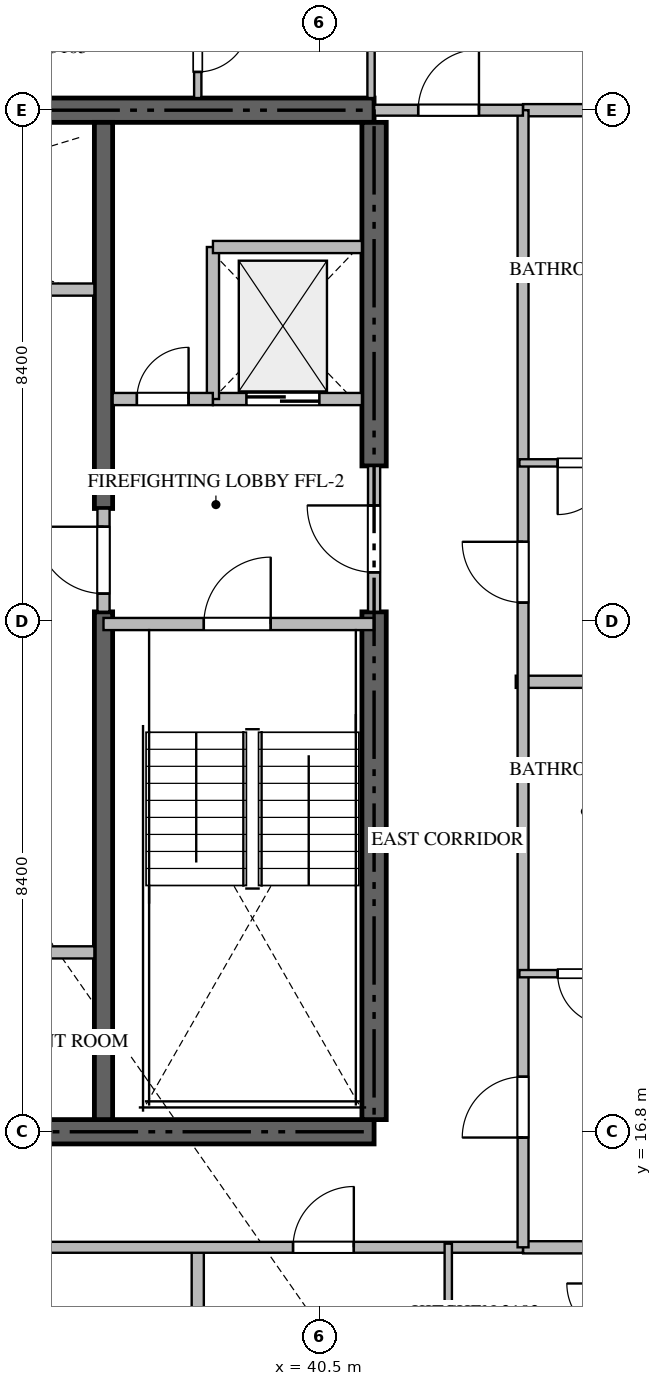
"""IFC4 building model, lengths in metres.
Left out: names, types, materials, properties, quantities, classifications, styles, units other than length and angle.
Written with IfcOpenShell. Run it as: python <this file> out.ifc"""

import sys

from ifc_helpers import new_model, si_unit, direction, frame, frame_2d, origin, place, context, subcontext, project, spatial, rectangle, extrude, source, transform, mapped, element, fill, save


model = new_model("IFC4")
c1 = context("Model", 3, precision=1e-05, world=origin(), true_north=direction((0.0, 1.0)))
c2 = subcontext(c1, "Body", "Model", "MODEL_VIEW")
j1 = project(units=[si_unit("LENGTHUNIT", "METRE"), si_unit("PLANEANGLEUNIT", "RADIAN")], contexts=[c1])
p1 = place(None, origin())
s1 = spatial("IfcSite", under=j1, at=p1, CompositionType="ELEMENT")
p2 = place(p1, origin())
s2 = spatial("IfcBuilding", under=s1, at=p2, CompositionType="ELEMENT")
p3 = place(p2, frame((0.0, 0.0, 127.65)))
s3 = spatial("IfcBuildingStorey", under=s2, at=p3, CompositionType="ELEMENT", Elevation=127.65)
for number, where, z_axis, x_axis in (
    (1, (23.4, 16.8, -0.26), (0.0, 0.0, 1.0), (1.0, 0.0, 0.0)),
    (2, (41.4, 33.6, -0.26), (0.0, 0.0, 1.0), (-1.0, 0.0, 0.0)),
):
    element("IfcWall", number, at=place(p3, frame(where, z_axis=z_axis, x_axis=x_axis)), inside=s3, PredefinedType="SHEAR", context=c2, shape_type="SweptSolid", body=[
        extrude(rectangle(XDim=18.0, YDim=0.4, at=frame_2d((9.0, 0.0))), origin(), (0.0, 0.0, 1.0), 3.748),
    ])
p4 = place(p3, frame((41.4, 17.0, -0.26), z_axis=(0.0, 0.0, 1.0), x_axis=(0.0, 1.0, 0.0)))
e3 = element("IfcWall", 3, at=p4, inside=s3, PredefinedType="SHEAR", context=c2, shape_type="SweptSolid", body=[
    extrude(rectangle(XDim=8.35, YDim=0.4, at=frame_2d((4.175, 0.0))), origin(), (0.0, 0.0, 1.0), 3.748),
])
p5 = place(p3, frame((41.4, 27.75, -0.26), z_axis=(0.0, 0.0, 1.0), x_axis=(0.0, 1.0, 0.0)))
e4 = element("IfcWall", 4, at=p5, inside=s3, PredefinedType="SHEAR", context=c2, shape_type="SweptSolid", body=[
    extrude(rectangle(XDim=5.65, YDim=0.4, at=frame_2d((2.825, 0.0))), origin(), (0.0, 0.0, 1.0), 3.748),
])
p6 = place(p3, frame((36.95, 17.0, -0.26), z_axis=(0.0, 0.0, 1.0), x_axis=(0.0, 1.0, 0.0)))
e5 = element("IfcWall", 5, at=p6, inside=s3, PredefinedType="SHEAR", context=c2, shape_type="SweptSolid", body=[
    extrude(rectangle(XDim=8.35, YDim=0.3, at=frame_2d((4.175, 0.0))), origin(), (0.0, 0.0, 1.0), 3.748),
])
p7 = place(p3, frame((36.95, 27.05, -0.26), z_axis=(0.0, 0.0, 1.0), x_axis=(0.0, 1.0, 0.0)))
e6 = element("IfcWall", 6, at=p7, inside=s3, PredefinedType="SHEAR", context=c2, shape_type="SweptSolid", body=[
    extrude(rectangle(XDim=6.35, YDim=0.3, at=frame_2d((3.175, 0.0))), origin(), (0.0, 0.0, 1.0), 3.748),
])
p8 = place(p3, frame((36.95, 25.15, 0.0), z_axis=(0.0, 0.0, 1.0), x_axis=(1.0, 0.0, 0.0)))
e7 = element("IfcWall", 7, at=p8, inside=s3, PredefinedType="STANDARD", context=c2, shape_type="SweptSolid", body=[
    extrude(rectangle(XDim=4.45, YDim=0.2, at=frame_2d((2.225, 0.0))), origin(), (0.0, 0.0, 1.0), 3.49),
])
p9 = place(p8, frame((1.65, 0.0, 0.0)))
e8 = element("IfcOpeningElement", 8, at=p9, cuts=e7, PredefinedType="OPENING", context=c2, shape_type="SweptSolid", body=[
    extrude(rectangle(XDim=1.1, YDim=2.15, at=frame_2d((0.55, 1.075))), frame((0.0, 0.11, 0.0), z_axis=(0.0, -1.0, 0.0), x_axis=(1.0, 0.0, 0.0)), (0.0, 0.0, 1.0), 0.22),
])
p10 = place(p3, frame((38.75, 28.85, 0.0), z_axis=(0.0, 0.0, 1.0), x_axis=(1.0, 0.0, 0.0)))
e9 = element("IfcWall", 9, at=p10, inside=s3, PredefinedType="STANDARD", context=c2, shape_type="SweptSolid", body=[
    extrude(rectangle(XDim=2.45, YDim=0.2, at=frame_2d((1.225, 0.0))), origin(), (0.0, 0.0, 1.0), 3.49),
])
p11 = place(p10, frame((0.55, 0.0, 0.0)))
e10 = element("IfcOpeningElement", 10, at=p11, cuts=e9, PredefinedType="OPENING", context=c2, shape_type="SweptSolid", body=[
    extrude(rectangle(XDim=1.2, YDim=2.2, at=frame_2d((0.6, 1.1))), frame((0.0, 0.11, 0.0), z_axis=(0.0, -1.0, 0.0), x_axis=(1.0, 0.0, 0.0)), (0.0, 0.0, 1.0), 0.22),
])
p12 = place(p3, frame((35.0, 30.65, 0.0), z_axis=(0.0, 0.0, 1.0), x_axis=(1.0, 0.0, 0.0)))
e11 = element("IfcWall", 11, at=p12, inside=s3, PredefinedType="STANDARD", context=c2, shape_type="SweptSolid", body=[
    extrude(rectangle(XDim=1.8, YDim=0.2, at=frame_2d((0.9, 0.0))), origin(), (0.0, 0.0, 1.0), 3.49),
])
p13 = place(p3, frame((38.75, 28.85, 0.0), z_axis=(0.0, 0.0, 1.0), x_axis=(0.0, 1.0, 0.0)))
e12 = element("IfcWall", 12, at=p13, inside=s3, PredefinedType="STANDARD", context=c2, shape_type="SweptSolid", body=[
    extrude(rectangle(XDim=2.5, YDim=0.2, at=frame_2d((1.25, 0.0))), origin(), (0.0, 0.0, 1.0), 3.49),
])
p14 = place(p3, frame((38.75, 31.35, 0.0), z_axis=(0.0, 0.0, 1.0), x_axis=(1.0, 0.0, 0.0)))
e13 = element("IfcWall", 13, at=p14, inside=s3, PredefinedType="STANDARD", context=c2, shape_type="SweptSolid", body=[
    extrude(rectangle(XDim=2.45, YDim=0.2, at=frame_2d((1.225, 0.0))), origin(), (0.0, 0.0, 1.0), 3.49),
])
p15 = place(p3, frame((37.1, 28.85, 0.0), z_axis=(0.0, 0.0, 1.0), x_axis=(1.0, 0.0, 0.0)))
e14 = element("IfcWall", 14, at=p15, inside=s3, PredefinedType="STANDARD", context=c2, shape_type="SweptSolid", body=[
    extrude(rectangle(XDim=1.648, YDim=0.2, at=frame_2d((0.824, 0.0))), origin(), (0.0, 0.0, 1.0), 3.49),
])
p16 = place(p15, frame((0.399, 0.0, 0.0)))
e15 = element("IfcOpeningElement", 15, at=p16, cuts=e14, PredefinedType="OPENING", context=c2, shape_type="SweptSolid", body=[
    extrude(rectangle(XDim=0.85, YDim=2.1, at=frame_2d((0.425, 1.05))), frame((0.0, 0.11, 0.0), z_axis=(0.0, -1.0, 0.0), x_axis=(1.0, 0.0, 0.0)), (0.0, 0.0, 1.0), 0.22),
])
p17 = place(p3, frame((41.4, 25.352, 0.0), z_axis=(0.0, 0.0, 1.0), x_axis=(0.0, 1.0, 0.0)))
e16 = element("IfcWall", 16, at=p17, inside=s3, PredefinedType="STANDARD", context=c2, shape_type="SweptSolid", body=[
    extrude(rectangle(XDim=2.396, YDim=0.2, at=frame_2d((1.198, 0.0))), origin(), (0.0, 0.0, 1.0), 3.49),
])
p18 = place(p17, frame((0.648, 0.0, 0.0)))
e17 = element("IfcOpeningElement", 17, at=p18, cuts=e16, PredefinedType="OPENING", context=c2, shape_type="SweptSolid", body=[
    extrude(rectangle(XDim=1.1, YDim=2.15, at=frame_2d((0.55, 1.075))), frame((0.0, 0.11, 0.0), z_axis=(0.0, -1.0, 0.0), x_axis=(1.0, 0.0, 0.0)), (0.0, 0.0, 1.0), 0.22),
])
p19 = place(p3, frame((36.95, 25.352, 0.0), z_axis=(0.0, 0.0, 1.0), x_axis=(0.0, 1.0, 0.0)))
e18 = element("IfcWall", 18, at=p19, inside=s3, PredefinedType="STANDARD", context=c2, shape_type="SweptSolid", body=[
    extrude(rectangle(XDim=1.696, YDim=0.2, at=frame_2d((0.848, 0.0))), origin(), (0.0, 0.0, 1.0), 3.49),
])
p20 = place(p19, frame((0.298, 0.0, 0.0)))
e19 = element("IfcOpeningElement", 19, at=p20, cuts=e18, PredefinedType="OPENING", context=c2, shape_type="SweptSolid", body=[
    extrude(rectangle(XDim=1.1, YDim=2.15, at=frame_2d((0.55, 1.075))), frame((0.0, 0.11, 0.0), z_axis=(0.0, -1.0, 0.0), x_axis=(1.0, 0.0, 0.0)), (0.0, 0.0, 1.0), 0.22),
])
p21 = place(p3, frame((28.0, 19.75, 0.0), z_axis=(0.0, 0.0, 1.0), x_axis=(1.0, 0.0, 0.0)))
e20 = element("IfcWall", 20, at=p21, inside=s3, PredefinedType="STANDARD", context=c2, shape_type="SweptSolid", body=[
    extrude(rectangle(XDim=8.8, YDim=0.2, at=frame_2d((4.4, 0.0))), origin(), (0.0, 0.0, 1.0), 3.49),
])
p22 = place(p21, frame((3.95, 0.0, 0.0)))
e21 = element("IfcOpeningElement", 21, at=p22, cuts=e20, PredefinedType="OPENING", context=c2, shape_type="SweptSolid", body=[
    extrude(rectangle(XDim=0.9, YDim=2.1, at=frame_2d((0.45, 1.05))), frame((0.0, 0.11, 0.0), z_axis=(0.0, -1.0, 0.0), x_axis=(1.0, 0.0, 0.0)), (0.0, 0.0, 1.0), 0.22),
])
p23 = place(p3, frame((38.5, 1.482, 0.0), z_axis=(0.0, 0.0, 1.0), x_axis=(0.0, 1.0, 0.0)))
e22 = element("IfcWall", 22, at=p23, inside=s3, PredefinedType="PARTITIONING", context=c2, shape_type="SweptSolid", body=[
    extrude(rectangle(XDim=13.418, YDim=0.2, at=frame_2d((6.709, 0.0))), origin(), (0.0, 0.0, 1.0), 3.49),
])
p24 = place(p3, frame((43.73, 24.2, 0.0), z_axis=(0.0, 0.0, 1.0), x_axis=(1.0, 0.0, 0.0)))
e23 = element("IfcWall", 23, at=p24, inside=s3, PredefinedType="PARTITIONING", context=c2, shape_type="SweptSolid", body=[
    extrude(rectangle(XDim=13.188, YDim=0.2, at=frame_2d((6.594, 0.0))), origin(), (0.0, 0.0, 1.0), 3.49),
])
for number, where, z_axis, x_axis in (
    (24, (43.85, 14.9, 0.0), (0.0, 0.0, 1.0), (1.0, 0.0, 0.0)),
    (25, (43.85, 33.6, 0.0), (0.0, 0.0, 1.0), (1.0, 0.0, 0.0)),
):
    element("IfcWall", number, at=place(p3, frame(where, z_axis=z_axis, x_axis=x_axis)), inside=s3, PredefinedType="PARTITIONING", context=c2, shape_type="SweptSolid", body=[
        extrude(rectangle(XDim=13.068, YDim=0.2, at=frame_2d((6.534, 0.0))), origin(), (0.0, 0.0, 1.0), 3.49),
    ])
p25 = place(p3, frame((20.952, 14.9, 0.0), z_axis=(0.0, 0.0, 1.0), x_axis=(1.0, 0.0, 0.0)))
e26 = element("IfcWall", 26, at=p25, inside=s3, PredefinedType="PARTITIONING", context=c2, shape_type="SweptSolid", body=[
    extrude(rectangle(XDim=22.896, YDim=0.18, at=frame_2d((11.448, 0.0))), origin(), (0.0, 0.0, 1.0), 3.49),
])
p26 = place(p25, frame((2.781, 0.0, 0.0)))
e27 = element("IfcOpeningElement", 27, at=p26, cuts=e26, PredefinedType="OPENING", context=c2, shape_type="SweptSolid", body=[
    extrude(rectangle(XDim=1.0, YDim=2.15, at=frame_2d((0.5, 1.075))), frame((0.0, 0.1, 0.0), z_axis=(0.0, -1.0, 0.0), x_axis=(1.0, 0.0, 0.0)), (0.0, 0.0, 1.0), 0.2),
])
p27 = place(p25, frame((7.16, 0.0, 0.0)))
e28 = element("IfcOpeningElement", 28, at=p27, cuts=e26, PredefinedType="OPENING", context=c2, shape_type="SweptSolid", body=[
    extrude(rectangle(XDim=1.0, YDim=2.15, at=frame_2d((0.5, 1.075))), frame((0.0, 0.1, 0.0), z_axis=(0.0, -1.0, 0.0), x_axis=(1.0, 0.0, 0.0)), (0.0, 0.0, 1.0), 0.2),
])
p28 = place(p25, frame((19.115, 0.0, 0.0)))
e29 = element("IfcOpeningElement", 29, at=p28, cuts=e26, PredefinedType="OPENING", context=c2, shape_type="SweptSolid", body=[
    extrude(rectangle(XDim=1.0, YDim=2.15, at=frame_2d((0.5, 1.075))), frame((0.0, 0.1, 0.0), z_axis=(0.0, -1.0, 0.0), x_axis=(1.0, 0.0, 0.0)), (0.0, 0.0, 1.0), 0.2),
])
p29 = place(p3, frame((43.85, 14.9, 0.0), z_axis=(0.0, 0.0, 1.0), x_axis=(0.0, 1.0, 0.0)))
e30 = element("IfcWall", 30, at=p29, inside=s3, PredefinedType="PARTITIONING", context=c2, shape_type="SweptSolid", body=[
    extrude(rectangle(XDim=18.7, YDim=0.18, at=frame_2d((9.35, 0.0))), origin(), (0.0, 0.0, 1.0), 3.49),
])
p30 = place(p29, frame((1.805, 0.0, 0.0)))
e31 = element("IfcOpeningElement", 31, at=p30, cuts=e30, PredefinedType="OPENING", context=c2, shape_type="SweptSolid", body=[
    extrude(rectangle(XDim=1.0, YDim=2.15, at=frame_2d((0.5, 1.075))), frame((0.0, 0.1, 0.0), z_axis=(0.0, -1.0, 0.0), x_axis=(1.0, 0.0, 0.0)), (0.0, 0.0, 1.0), 0.2),
])
p31 = place(p29, frame((10.602, 0.0, 0.0)))
e32 = element("IfcOpeningElement", 32, at=p31, cuts=e30, PredefinedType="OPENING", context=c2, shape_type="SweptSolid", body=[
    extrude(rectangle(XDim=1.0, YDim=2.15, at=frame_2d((0.5, 1.075))), frame((0.0, 0.1, 0.0), z_axis=(0.0, -1.0, 0.0), x_axis=(1.0, 0.0, 0.0)), (0.0, 0.0, 1.0), 0.2),
])
p32 = place(p3, frame((41.402, 33.6, 0.0), z_axis=(0.0, 0.0, 1.0), x_axis=(1.0, 0.0, 0.0)))
e33 = element("IfcWall", 33, at=p32, inside=s3, PredefinedType="PARTITIONING", context=c2, shape_type="SweptSolid", body=[
    extrude(rectangle(XDim=2.446, YDim=0.18, at=frame_2d((1.223, 0.0))), origin(), (0.0, 0.0, 1.0), 3.49),
])
p33 = place(p32, frame((0.723, 0.0, 0.0)))
e34 = element("IfcOpeningElement", 34, at=p33, cuts=e33, PredefinedType="OPENING", context=c2, shape_type="SweptSolid", body=[
    extrude(rectangle(XDim=1.0, YDim=2.15, at=frame_2d((0.5, 1.075))), frame((0.0, 0.1, 0.0), z_axis=(0.0, -1.0, 0.0), x_axis=(1.0, 0.0, 0.0)), (0.0, 0.0, 1.0), 0.2),
])
p34 = place(p3, frame((42.62, 12.15, 0.0), z_axis=(0.0, 0.0, 1.0), x_axis=(0.0, 1.0, 0.0)))
e35 = element("IfcWall", 35, at=p34, inside=s3, PredefinedType="PARTITIONING", context=c2, shape_type="SweptSolid", body=[
    extrude(rectangle(XDim=2.81, YDim=0.12, at=frame_2d((1.405, 0.0))), origin(), (0.0, 0.0, 1.0), 3.49),
])
p35 = place(p3, frame((41.35, 36.35, 0.0), z_axis=(0.0, 0.0, 1.0), x_axis=(0.0, -1.0, 0.0)))
e36 = element("IfcWall", 36, at=p35, inside=s3, PredefinedType="PARTITIONING", context=c2, shape_type="SweptSolid", body=[
    extrude(rectangle(XDim=2.55, YDim=0.12, at=frame_2d((1.275, 0.0))), origin(), (0.0, 0.0, 1.0), 3.49),
])
p36 = place(p3, frame((38.5, 35.648, 0.0), z_axis=(0.0, 0.0, 1.0), x_axis=(0.0, -1.0, 0.0)))
e37 = element("IfcWall", 37, at=p36, inside=s3, PredefinedType="PARTITIONING", context=c2, shape_type="SweptSolid", body=[
    extrude(rectangle(XDim=1.848, YDim=0.12, at=frame_2d((0.924, 0.0))), origin(), (0.0, 0.0, 1.0), 3.49),
])
p37 = place(p36, frame((0.569, 0.0, 0.0)))
e38 = element("IfcOpeningElement", 38, at=p37, cuts=e37, PredefinedType="OPENING", context=c2, shape_type="SweptSolid", body=[
    extrude(rectangle(XDim=0.85, YDim=2.1, at=frame_2d((0.425, 1.05))), frame((0.0, 0.07, 0.0), z_axis=(0.0, -1.0, 0.0), x_axis=(1.0, 0.0, 0.0)), (0.0, 0.0, 1.0), 0.14),
])
p38 = place(p3, frame((45.898, 19.4, 0.0), z_axis=(0.0, 0.0, 1.0), x_axis=(-1.0, 0.0, 0.0)))
e39 = element("IfcWall", 39, at=p38, inside=s3, PredefinedType="PARTITIONING", context=c2, shape_type="SweptSolid", body=[
    extrude(rectangle(XDim=2.108, YDim=0.12, at=frame_2d((1.054, 0.0))), origin(), (0.0, 0.0, 1.0), 3.49),
])
p39 = place(p38, frame((0.629, 0.0, 0.0)))
e40 = element("IfcOpeningElement", 40, at=p39, cuts=e39, PredefinedType="OPENING", context=c2, shape_type="SweptSolid", body=[
    extrude(rectangle(XDim=0.85, YDim=2.1, at=frame_2d((0.425, 1.05))), frame((0.0, 0.07, 0.0), z_axis=(0.0, -1.0, 0.0), x_axis=(1.0, 0.0, 0.0)), (0.0, 0.0, 1.0), 0.14),
])
p40 = place(p3, frame((45.898, 27.8, 0.0), z_axis=(0.0, 0.0, 1.0), x_axis=(-1.0, 0.0, 0.0)))
e41 = element("IfcWall", 41, at=p40, inside=s3, PredefinedType="PARTITIONING", context=c2, shape_type="SweptSolid", body=[
    extrude(rectangle(XDim=2.108, YDim=0.12, at=frame_2d((1.054, 0.0))), origin(), (0.0, 0.0, 1.0), 3.49),
])
p41 = place(p40, frame((0.629, 0.0, 0.0)))
e42 = element("IfcOpeningElement", 42, at=p41, cuts=e41, PredefinedType="OPENING", context=c2, shape_type="SweptSolid", body=[
    extrude(rectangle(XDim=0.85, YDim=2.1, at=frame_2d((0.425, 1.05))), frame((0.0, 0.07, 0.0), z_axis=(0.0, -1.0, 0.0), x_axis=(1.0, 0.0, 0.0)), (0.0, 0.0, 1.0), 0.14),
])
m1 = source(origin(), c2, "Body", "SweptSolid", [
    extrude(rectangle(XDim=1.1, YDim=2.15, at=frame_2d((0.55, 1.075))), frame((0.0, 0.025, 0.0), z_axis=(0.0, -1.0, 0.0), x_axis=(1.0, 0.0, 0.0)), (0.0, 0.0, 1.0), 0.05),
])
p42 = place(p9, origin())
e43 = element("IfcDoor", 43, at=p42, inside=s3, OperationType="SINGLE_SWING_RIGHT", PredefinedType="DOOR", context=c2, shape_type="MappedRepresentation", body=[
    mapped(m1, transform((0.0, 0.0, 0.0), scale=1.0)),
])
fill(e8, e43)
m2 = source(origin(), c2, "Body", "SweptSolid", [
    extrude(rectangle(XDim=1.2, YDim=2.2, at=frame_2d((0.6, 1.1))), frame((0.0, 0.025, 0.0), z_axis=(0.0, -1.0, 0.0), x_axis=(1.0, 0.0, 0.0)), (0.0, 0.0, 1.0), 0.05),
])
p43 = place(p11, origin())
e44 = element("IfcDoor", 44, at=p43, inside=s3, OperationType="DOUBLE_DOOR_SLIDING", PredefinedType="DOOR", context=c2, shape_type="MappedRepresentation", body=[
    mapped(m2, transform((0.0, 0.0, 0.0), scale=1.0)),
])
fill(e10, e44)
m3 = source(origin(), c2, "Body", "SweptSolid", [
    extrude(rectangle(XDim=0.85, YDim=2.1, at=frame_2d((0.425, 1.05))), frame((0.0, 0.025, 0.0), z_axis=(0.0, -1.0, 0.0), x_axis=(1.0, 0.0, 0.0)), (0.0, 0.0, 1.0), 0.05),
])
p44 = place(p16, origin())
e45 = element("IfcDoor", 45, at=p44, inside=s3, OperationType="SINGLE_SWING_RIGHT", PredefinedType="DOOR", context=c2, shape_type="MappedRepresentation", body=[
    mapped(m3, transform((0.0, 0.0, 0.0), scale=1.0)),
])
fill(e15, e45)
p45 = place(p18, origin())
e46 = element("IfcDoor", 46, at=p45, inside=s3, OperationType="SINGLE_SWING_RIGHT", PredefinedType="DOOR", context=c2, shape_type="MappedRepresentation", body=[
    mapped(m1, transform((0.0, 0.0, 0.0), scale=1.0)),
])
fill(e17, e46)
p46 = place(p20, origin())
e47 = element("IfcDoor", 47, at=p46, inside=s3, OperationType="SINGLE_SWING_RIGHT", PredefinedType="DOOR", context=c2, shape_type="MappedRepresentation", body=[
    mapped(m1, transform((0.0, 0.0, 0.0), scale=1.0)),
])
fill(e19, e47)
m4 = source(origin(), c2, "Body", "SweptSolid", [
    extrude(rectangle(XDim=1.0, YDim=2.15, at=frame_2d((0.5, 1.075))), frame((0.0, 0.025, 0.0), z_axis=(0.0, -1.0, 0.0), x_axis=(1.0, 0.0, 0.0)), (0.0, 0.0, 1.0), 0.05),
])
p47 = place(p28, origin())
e48 = element("IfcDoor", 48, at=p47, inside=s3, OperationType="SINGLE_SWING_RIGHT", PredefinedType="DOOR", context=c2, shape_type="MappedRepresentation", body=[
    mapped(m4, transform((0.0, 0.0, 0.0), scale=1.0)),
])
fill(e29, e48)
p48 = place(p30, origin())
e49 = element("IfcDoor", 49, at=p48, inside=s3, OperationType="SINGLE_SWING_LEFT", PredefinedType="DOOR", context=c2, shape_type="MappedRepresentation", body=[
    mapped(m4, transform((0.0, 0.0, 0.0), scale=1.0)),
])
fill(e31, e49)
p49 = place(p31, origin())
e50 = element("IfcDoor", 50, at=p49, inside=s3, OperationType="SINGLE_SWING_RIGHT", PredefinedType="DOOR", context=c2, shape_type="MappedRepresentation", body=[
    mapped(m4, transform((0.0, 0.0, 0.0), scale=1.0)),
])
fill(e32, e50)
p50 = place(p33, origin())
e51 = element("IfcDoor", 51, at=p50, inside=s3, OperationType="SINGLE_SWING_RIGHT", PredefinedType="DOOR", context=c2, shape_type="MappedRepresentation", body=[
    mapped(m4, transform((0.0, 0.0, 0.0), scale=1.0)),
])
fill(e34, e51)
p51 = place(p37, origin())
e52 = element("IfcDoor", 52, at=p51, inside=s3, OperationType="SINGLE_SWING_LEFT", PredefinedType="DOOR", context=c2, shape_type="MappedRepresentation", body=[
    mapped(m3, transform((0.0, 0.0, 0.0), scale=1.0)),
])
fill(e38, e52)
p52 = place(p39, origin())
e53 = element("IfcDoor", 53, at=p52, inside=s3, OperationType="SINGLE_SWING_LEFT", PredefinedType="DOOR", context=c2, shape_type="MappedRepresentation", body=[
    mapped(m3, transform((0.0, 0.0, 0.0), scale=1.0)),
])
fill(e40, e53)
p53 = place(p41, origin())
e54 = element("IfcDoor", 54, at=p53, inside=s3, OperationType="SINGLE_SWING_RIGHT", PredefinedType="DOOR", context=c2, shape_type="MappedRepresentation", body=[
    mapped(m3, transform((0.0, 0.0, 0.0), scale=1.0)),
])
fill(e42, e54)
save(model, sys.argv[1])
